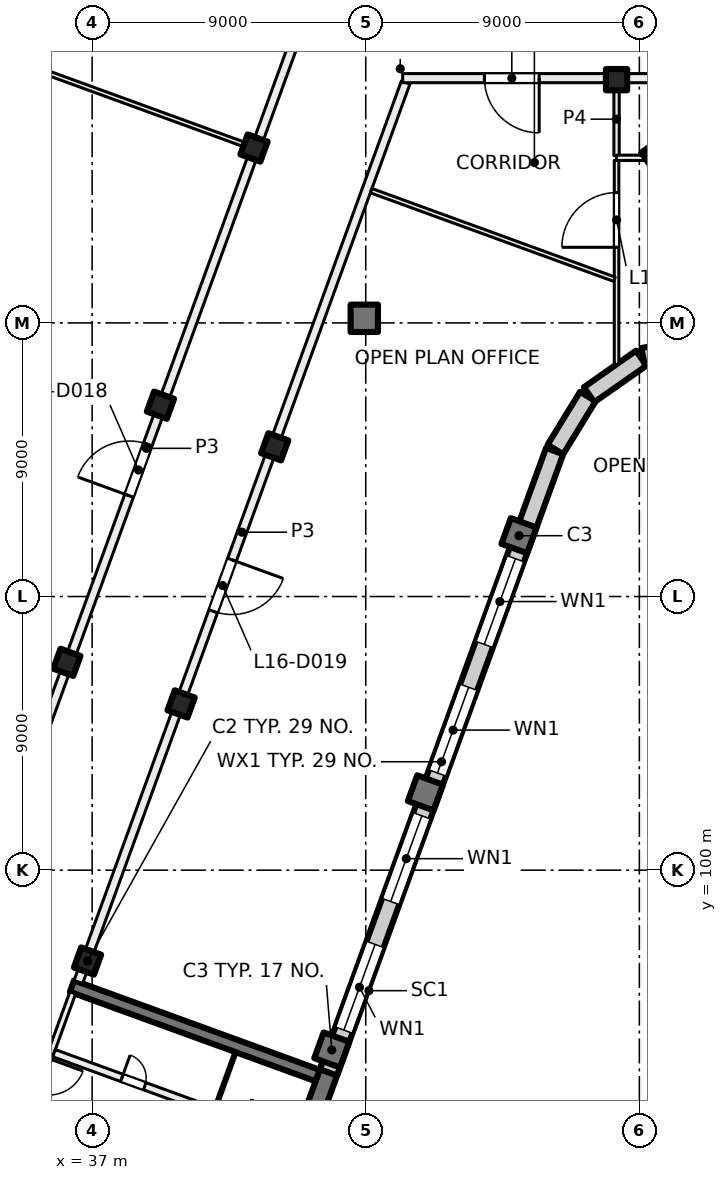
"""IFC4 building model, lengths in metres.
Left out: names, types, materials, properties, quantities, classifications, styles, units other than length and angle.
Written with IfcOpenShell. Run it as: python <this file> out.ifc"""

import sys

from ifc_helpers import new_model, si_unit, direction, frame, frame_2d, origin, origin_2d, place, context, subcontext, project, spatial, rectangle, hollow_rectangle, extrude, element, fill, save


model = new_model("IFC4")
c1 = context("Model", 3, precision=1e-05, world=origin(), true_north=direction((0.0, 1.0)))
c2 = subcontext(c1, "Body", "Model", "MODEL_VIEW")
j1 = project(units=[si_unit("LENGTHUNIT", "METRE"), si_unit("PLANEANGLEUNIT", "RADIAN")], contexts=[c1])
p1 = place(None, origin())
s1 = spatial("IfcSite", under=j1, at=p1, CompositionType="ELEMENT")
p2 = place(p1, origin())
s2 = spatial("IfcBuilding", under=s1, at=p2, CompositionType="ELEMENT")
p3 = place(p2, frame((0.0, 0.0, 71.5)))
s3 = spatial("IfcBuildingStorey", under=s2, at=p3, CompositionType="ELEMENT", Elevation=71.5)
p4 = place(p3, frame((56.036, 123.43, 0.0), z_axis=(0.0, 0.0, 1.0), x_axis=(0.573576436351, -0.819152044289, 0.0)))
e1 = element("IfcColumn", 1, at=p4, inside=s3, PredefinedType="COLUMN", context=c2, shape_type="SweptSolid", body=[
    extrude(hollow_rectangle(XDim=1.4, YDim=1.4, WallThickness=0.04, at=origin_2d()), origin(), (0.0, 0.0, 1.0), 4.0),
])
p5 = place(p3, frame((54.25, 126.0, 0.0), z_axis=(0.0, 0.0, 1.0), x_axis=(1.0, 0.0, 0.0)))
e2 = element("IfcColumn", 2, at=p5, inside=s3, PredefinedType="COLUMN", context=c2, shape_type="SweptSolid", body=[
    extrude(rectangle(XDim=0.7, YDim=0.7, at=origin_2d()), origin(), (0.0, 0.0, 1.0), 4.0),
])
p6 = place(p3, frame((45.952, 118.152, 0.0), z_axis=(0.0, 0.0, 1.0), x_axis=(1.0, 0.0, 0.0)))
e3 = element("IfcColumn", 3, at=p6, inside=s3, PredefinedType="COLUMN", context=c2, shape_type="SweptSolid", body=[
    extrude(rectangle(XDim=0.9, YDim=0.9, at=origin_2d()), origin(), (0.0, 0.0, 1.0), 4.0),
])
for number, where, z_axis, x_axis in (
    (4, (43.006, 113.925, 0.0), (0.0, 0.0, 1.0), (-0.342, -0.94, 0.0)),
    (5, (39.927, 105.468, 0.0), (0.0, 0.0, 1.0), (-0.342, -0.94, 0.0)),
    (6, (36.849, 97.011, 0.0), (0.0, 0.0, 1.0), (-0.342, -0.94, 0.0)),
    (7, (42.325, 123.751, 0.0), (0.0, 0.0, 1.0), (-0.342, -0.94, 0.0)),
    (8, (39.247, 115.293, 0.0), (0.0, 0.0, 1.0), (-0.342, -0.94, 0.0)),
    (9, (36.169, 106.836, 0.0), (0.0, 0.0, 1.0), (-0.342, -0.94, 0.0)),
):
    element("IfcColumn", number, at=place(p3, frame(where, z_axis=z_axis, x_axis=x_axis)), inside=s3, PredefinedType="COLUMN", context=c2, shape_type="SweptSolid", body=[
        extrude(rectangle(XDim=0.7, YDim=0.7, at=origin_2d()), origin(), (0.0, 0.0, 1.0), 4.0),
    ])
for number, where, z_axis, x_axis in (
    (10, (51.04, 111.001, 0.0), (0.0, 0.0, 1.0), (-0.342, -0.94, 0.0)),
    (11, (47.962, 102.544, 0.0), (0.0, 0.0, 1.0), (-0.342, -0.94, 0.0)),
    (12, (44.884, 94.087, 0.0), (0.0, 0.0, 1.0), (-0.342, -0.94, 0.0)),
):
    element("IfcColumn", number, at=place(p3, frame(where, z_axis=z_axis, x_axis=x_axis)), inside=s3, PredefinedType="COLUMN", context=c2, shape_type="SweptSolid", body=[
        extrude(rectangle(XDim=0.9, YDim=0.9, at=origin_2d()), origin(), (0.0, 0.0, 1.0), 4.0),
    ])
p7 = place(p3, frame((41.827, 85.249, 0.0), z_axis=(0.0, 0.0, 1.0), x_axis=(0.342016162452, 0.939694069696, 0.0)))
e13 = element("IfcWall", 13, at=p7, inside=s3, PredefinedType="SHEAR", context=c2, shape_type="SweptSolid", body=[
    extrude(rectangle(XDim=8.9, YDim=0.6, at=frame_2d((4.45, 0.0))), origin(), (0.0, 0.0, 1.0), 4.0),
])
p8 = place(p3, frame((44.418, 93.245, 0.0), z_axis=(0.0, 0.0, 1.0), x_axis=(-0.93969060187, 0.342025690201, 0.0)))
e14 = element("IfcWall", 14, at=p8, inside=s3, PredefinedType="SHEAR", context=c2, shape_type="SweptSolid", body=[
    extrude(rectangle(XDim=8.6, YDim=0.4, at=frame_2d((4.3, 0.0))), origin(), (0.0, 0.0, 1.0), 4.0),
])
p9 = place(p3, frame((52.212, 113.783, 0.0), z_axis=(0.0, 0.0, 1.0), x_axis=(-0.34202521188, -0.939690775968, 0.0)))
e15 = element("IfcWall", 15, at=p9, inside=s3, PredefinedType="SOLIDWALL", context=c2, shape_type="SweptSolid", body=[
    extrude(rectangle(XDim=21.745, YDim=0.6, at=frame_2d((10.873, 0.0))), origin(), (0.0, 0.0, 1.0), 3.625),
])
p10 = place(p9, frame((3.765, 0.0, 0.9)))
e16 = element("IfcOpeningElement", 16, at=p10, cuts=e15, PredefinedType="OPENING", context=c2, shape_type="SweptSolid", body=[
    extrude(rectangle(XDim=3.0, YDim=2.4, at=frame_2d((1.5, 1.2))), frame((0.0, 0.31, 0.0), z_axis=(0.0, -1.0, 0.0), x_axis=(1.0, 0.0, 0.0)), (0.0, 0.0, 1.0), 0.62),
])
p11 = place(p9, frame((8.265, 0.0, 0.9)))
e17 = element("IfcOpeningElement", 17, at=p11, cuts=e15, PredefinedType="OPENING", context=c2, shape_type="SweptSolid", body=[
    extrude(rectangle(XDim=3.0, YDim=2.4, at=frame_2d((1.5, 1.2))), frame((0.0, 0.31, 0.0), z_axis=(0.0, -1.0, 0.0), x_axis=(1.0, 0.0, 0.0)), (0.0, 0.0, 1.0), 0.62),
])
p12 = place(p9, frame((12.765, 0.0, 0.9)))
e18 = element("IfcOpeningElement", 18, at=p12, cuts=e15, PredefinedType="OPENING", context=c2, shape_type="SweptSolid", body=[
    extrude(rectangle(XDim=3.0, YDim=2.4, at=frame_2d((1.5, 1.2))), frame((0.0, 0.31, 0.0), z_axis=(0.0, -1.0, 0.0), x_axis=(1.0, 0.0, 0.0)), (0.0, 0.0, 1.0), 0.62),
])
p13 = place(p9, frame((17.265, 0.0, 0.9)))
e19 = element("IfcOpeningElement", 19, at=p13, cuts=e15, PredefinedType="OPENING", context=c2, shape_type="SweptSolid", body=[
    extrude(rectangle(XDim=3.0, YDim=2.4, at=frame_2d((1.5, 1.2))), frame((0.0, 0.31, 0.0), z_axis=(0.0, -1.0, 0.0), x_axis=(1.0, 0.0, 0.0)), (0.0, 0.0, 1.0), 0.62),
])
p14 = place(p3, frame((53.305, 115.578, 0.0), z_axis=(0.0, 0.0, 1.0), x_axis=(-0.522402266438, -0.852699168535, 0.0)))
e20 = element("IfcWall", 20, at=p14, inside=s3, PredefinedType="SOLIDWALL", context=c2, shape_type="SweptSolid", body=[
    extrude(rectangle(XDim=2.042, YDim=0.6, at=frame_2d((1.021, 0.0))), origin(), (0.0, 0.0, 1.0), 3.625),
])
for number, where, z_axis, x_axis in (
    (21, (55.062, 116.839, 0.0), (0.0, 0.0, 1.0), (-0.819, -0.574, 0.0)),
    (22, (57.175, 117.294, 0.0), (0.0, 0.0, 1.0), (-0.98, -0.199, 0.0)),
):
    element("IfcWall", number, at=place(p3, frame(where, z_axis=z_axis, x_axis=x_axis)), inside=s3, PredefinedType="SOLIDWALL", context=c2, shape_type="SweptSolid", body=[
        extrude(rectangle(XDim=2.092, YDim=0.6, at=frame_2d((1.046, 0.0))), origin(), (0.0, 0.0, 1.0), 3.625),
    ])
p15 = place(p3, frame((24.666, 100.669, 0.0), z_axis=(0.0, 0.0, 1.0), x_axis=(0.34201964167, 0.939692803373, 0.0)))
e23 = element("IfcWall", 23, at=p15, inside=s3, PredefinedType="SOLIDWALL", context=c2, shape_type="SweptSolid", body=[
    extrude(rectangle(XDim=32.884, YDim=0.6, at=frame_2d((16.442, 0.0))), origin(), (0.0, 0.0, 1.0), 3.625),
])
p16 = place(p15, frame((1.48, 0.0, 0.9)))
e24 = element("IfcOpeningElement", 24, at=p16, cuts=e23, PredefinedType="OPENING", context=c2, shape_type="SweptSolid", body=[
    extrude(rectangle(XDim=3.0, YDim=2.4, at=frame_2d((1.5, 1.2))), frame((0.0, 0.31, 0.0), z_axis=(0.0, -1.0, 0.0), x_axis=(1.0, 0.0, 0.0)), (0.0, 0.0, 1.0), 0.62),
])
p17 = place(p15, frame((5.98, 0.0, 0.9)))
e25 = element("IfcOpeningElement", 25, at=p17, cuts=e23, PredefinedType="OPENING", context=c2, shape_type="SweptSolid", body=[
    extrude(rectangle(XDim=3.0, YDim=2.4, at=frame_2d((1.5, 1.2))), frame((0.0, 0.31, 0.0), z_axis=(0.0, -1.0, 0.0), x_axis=(1.0, 0.0, 0.0)), (0.0, 0.0, 1.0), 0.62),
])
p18 = place(p15, frame((10.48, 0.0, 0.9)))
e26 = element("IfcOpeningElement", 26, at=p18, cuts=e23, PredefinedType="OPENING", context=c2, shape_type="SweptSolid", body=[
    extrude(rectangle(XDim=3.0, YDim=2.4, at=frame_2d((1.5, 1.2))), frame((0.0, 0.31, 0.0), z_axis=(0.0, -1.0, 0.0), x_axis=(1.0, 0.0, 0.0)), (0.0, 0.0, 1.0), 0.62),
])
p19 = place(p15, frame((14.98, 0.0, 0.9)))
e27 = element("IfcOpeningElement", 27, at=p19, cuts=e23, PredefinedType="OPENING", context=c2, shape_type="SweptSolid", body=[
    extrude(rectangle(XDim=3.0, YDim=2.4, at=frame_2d((1.5, 1.2))), frame((0.0, 0.31, 0.0), z_axis=(0.0, -1.0, 0.0), x_axis=(1.0, 0.0, 0.0)), (0.0, 0.0, 1.0), 0.62),
])
p20 = place(p15, frame((19.48, 0.0, 0.9)))
e28 = element("IfcOpeningElement", 28, at=p20, cuts=e23, PredefinedType="OPENING", context=c2, shape_type="SweptSolid", body=[
    extrude(rectangle(XDim=3.0, YDim=2.4, at=frame_2d((1.5, 1.2))), frame((0.0, 0.31, 0.0), z_axis=(0.0, -1.0, 0.0), x_axis=(1.0, 0.0, 0.0)), (0.0, 0.0, 1.0), 0.62),
])
p21 = place(p15, frame((23.98, 0.0, 0.9)))
e29 = element("IfcOpeningElement", 29, at=p21, cuts=e23, PredefinedType="OPENING", context=c2, shape_type="SweptSolid", body=[
    extrude(rectangle(XDim=3.0, YDim=2.4, at=frame_2d((1.5, 1.2))), frame((0.0, 0.31, 0.0), z_axis=(0.0, -1.0, 0.0), x_axis=(1.0, 0.0, 0.0)), (0.0, 0.0, 1.0), 0.62),
])
p22 = place(p15, frame((28.48, 0.0, 0.9)))
e30 = element("IfcOpeningElement", 30, at=p22, cuts=e23, PredefinedType="OPENING", context=c2, shape_type="SweptSolid", body=[
    extrude(rectangle(XDim=3.0, YDim=2.4, at=frame_2d((1.5, 1.2))), frame((0.0, 0.31, 0.0), z_axis=(0.0, -1.0, 0.0), x_axis=(1.0, 0.0, 0.0)), (0.0, 0.0, 1.0), 0.62),
])
p23 = place(p3, frame((36.362, 95.964, 0.0), z_axis=(0.0, 0.0, 1.0), x_axis=(-0.341995824804, -0.939701471648, 0.0)))
e31 = element("IfcWall", 31, at=p23, inside=s3, PredefinedType="PARTITIONING", context=c2, shape_type="SweptSolid", body=[
    extrude(rectangle(XDim=3.8, YDim=0.2, at=frame_2d((1.9, 0.0))), origin(), (0.0, 0.0, 1.0), 3.625),
])
p24 = place(p23, frame((2.3, 0.0, 0.0)))
e32 = element("IfcOpeningElement", 32, at=p24, cuts=e31, PredefinedType="OPENING", context=c2, shape_type="SweptSolid", body=[
    extrude(rectangle(XDim=1.2, YDim=2.1, at=frame_2d((0.6, 1.05))), frame((0.0, 0.11, 0.0), z_axis=(0.0, -1.0, 0.0), x_axis=(1.0, 0.0, 0.0)), (0.0, 0.0, 1.0), 0.22),
])
p25 = place(p3, frame((35.19, 92.453, 0.0), z_axis=(0.0, 0.0, 1.0), x_axis=(0.939691552312, -0.342023078919, 0.0)))
e33 = element("IfcWall", 33, at=p25, inside=s3, PredefinedType="PARTITIONING", context=c2, shape_type="SweptSolid", body=[
    extrude(rectangle(XDim=8.4, YDim=0.2, at=frame_2d((4.2, 0.0))), origin(), (0.0, 0.0, 1.0), 3.625),
])
p26 = place(p25, frame((5.25, 0.0, 0.0)))
e34 = element("IfcOpeningElement", 34, at=p26, cuts=e33, PredefinedType="OPENING", context=c2, shape_type="SweptSolid", body=[
    extrude(rectangle(XDim=1.5, YDim=2.1, at=frame_2d((0.75, 1.05))), frame((0.0, 0.11, 0.0), z_axis=(0.0, -1.0, 0.0), x_axis=(1.0, 0.0, 0.0)), (0.0, 0.0, 1.0), 0.22),
])
p27 = place(p3, frame((35.746, 93.98, 0.0), z_axis=(0.0, 0.0, 1.0), x_axis=(0.939691552312, -0.342023078919, 0.0)))
e35 = element("IfcWall", 35, at=p27, inside=s3, PredefinedType="PARTITIONING", context=c2, shape_type="SweptSolid", body=[
    extrude(rectangle(XDim=8.4, YDim=0.25, at=frame_2d((4.2, 0.0))), origin(), (0.0, 0.0, 1.0), 3.625),
])
p28 = place(p27, frame((2.375, 0.0, 0.0)))
e36 = element("IfcOpeningElement", 36, at=p28, cuts=e35, PredefinedType="OPENING", context=c2, shape_type="SweptSolid", body=[
    extrude(rectangle(XDim=0.8, YDim=2.1, at=frame_2d((0.4, 1.05))), frame((0.0, 0.135, 0.0), z_axis=(0.0, -1.0, 0.0), x_axis=(1.0, 0.0, 0.0)), (0.0, 0.0, 1.0), 0.27),
])
p29 = place(p27, frame((6.625, 0.0, 0.0)))
e37 = element("IfcOpeningElement", 37, at=p29, cuts=e35, PredefinedType="OPENING", context=c2, shape_type="SweptSolid", body=[
    extrude(rectangle(XDim=0.8, YDim=2.1, at=frame_2d((0.4, 1.05))), frame((0.0, 0.135, 0.0), z_axis=(0.0, -1.0, 0.0), x_axis=(1.0, 0.0, 0.0)), (0.0, 0.0, 1.0), 0.27),
])
p30 = place(p3, frame((41.718, 94.015, 0.0), z_axis=(0.0, 0.0, 1.0), x_axis=(-0.342064742067, -0.939676386973, 0.0)))
e38 = element("IfcWall", 38, at=p30, inside=s3, PredefinedType="PARTITIONING", context=c2, shape_type="SweptSolid", body=[
    extrude(rectangle(XDim=1.95, YDim=0.1, at=frame_2d((0.975, 0.0))), origin(), (0.0, 0.0, 1.0), 3.625),
])
p31 = place(p3, frame((32.881, 97.657, 0.0), z_axis=(0.0, 0.0, 1.0), x_axis=(0.342017360004, 0.939693633828, 0.0)))
e39 = element("IfcWall", 39, at=p31, inside=s3, PredefinedType="PARTITIONING", context=c2, shape_type="SweptSolid", body=[
    extrude(rectangle(XDim=34.516, YDim=0.3, at=frame_2d((17.258, 0.0))), origin(), (0.0, 0.0, 1.0), 3.625),
])
p32 = place(p31, frame((2.025, 0.0, 0.0)))
e40 = element("IfcOpeningElement", 40, at=p32, cuts=e39, PredefinedType="OPENING", context=c2, shape_type="SweptSolid", body=[
    extrude(rectangle(XDim=1.2, YDim=2.1, at=frame_2d((0.6, 1.05))), frame((0.0, 0.16, 0.0), z_axis=(0.0, -1.0, 0.0), x_axis=(1.0, 0.0, 0.0)), (0.0, 0.0, 1.0), 0.32),
])
p33 = place(p31, frame((15.6, 0.0, 0.0)))
e41 = element("IfcOpeningElement", 41, at=p33, cuts=e39, PredefinedType="OPENING", context=c2, shape_type="SweptSolid", body=[
    extrude(rectangle(XDim=1.8, YDim=2.1, at=frame_2d((0.9, 1.05))), frame((0.0, 0.16, 0.0), z_axis=(0.0, -1.0, 0.0), x_axis=(1.0, 0.0, 0.0)), (0.0, 0.0, 1.0), 0.32),
])
p34 = place(p3, frame((42.231, 123.785, 0.0), z_axis=(0.0, 0.0, 1.0), x_axis=(-0.939687752599, 0.342033518263, 0.0)))
e42 = element("IfcWall", 42, at=p34, inside=s3, PredefinedType="PARTITIONING", context=c2, shape_type="SweptSolid", body=[
    extrude(rectangle(XDim=8.301, YDim=0.15, at=frame_2d((4.15, 0.0))), origin(), (0.0, 0.0, 1.0), 3.625),
])
p35 = place(p3, frame((47.314, 125.909, 0.0), z_axis=(0.0, 0.0, 1.0), x_axis=(-0.342010770371, -0.939696032209, 0.0)))
e43 = element("IfcWall", 43, at=p35, inside=s3, PredefinedType="PARTITIONING", context=c2, shape_type="SweptSolid", body=[
    extrude(rectangle(XDim=31.485, YDim=0.3, at=frame_2d((15.742, 0.0))), origin(), (0.0, 0.0, 1.0), 3.625),
])
p36 = place(p35, frame((16.709, 0.0, 0.0)))
e44 = element("IfcOpeningElement", 44, at=p36, cuts=e43, PredefinedType="OPENING", context=c2, shape_type="SweptSolid", body=[
    extrude(rectangle(XDim=1.8, YDim=2.1, at=frame_2d((0.9, 1.05))), frame((0.0, 0.16, 0.0), z_axis=(0.0, -1.0, 0.0), x_axis=(1.0, 0.0, 0.0)), (0.0, 0.0, 1.0), 0.32),
])
p37 = place(p3, frame((54.25, 116.637, 0.0), z_axis=(0.0, 0.0, 1.0), x_axis=(0.0, 1.0, 0.0)))
e45 = element("IfcWall", 45, at=p37, inside=s3, PredefinedType="PARTITIONING", context=c2, shape_type="SweptSolid", body=[
    extrude(rectangle(XDim=6.709, YDim=0.15, at=frame_2d((3.354, 0.0))), origin(), (0.0, 0.0, 1.0), 3.625),
])
p38 = place(p37, frame((3.85, 0.0, 0.0)))
e46 = element("IfcOpeningElement", 46, at=p38, cuts=e45, PredefinedType="OPENING", context=c2, shape_type="SweptSolid", body=[
    extrude(rectangle(XDim=1.8, YDim=2.1, at=frame_2d((0.9, 1.05))), frame((0.0, 0.085, 0.0), z_axis=(0.0, -1.0, 0.0), x_axis=(1.0, 0.0, 0.0)), (0.0, 0.0, 1.0), 0.17),
])
p39 = place(p3, frame((54.18, 119.436, 0.0), z_axis=(0.0, 0.0, 1.0), x_axis=(-0.939669476286, 0.342083725624, 0.0)))
e47 = element("IfcWall", 47, at=p39, inside=s3, PredefinedType="PARTITIONING", context=c2, shape_type="SweptSolid", body=[
    extrude(rectangle(XDim=8.516, YDim=0.15, at=frame_2d((4.258, 0.0))), origin(), (0.0, 0.0, 1.0), 3.625),
])
p40 = place(p3, frame((54.25, 123.502, 0.0), z_axis=(0.0, 0.0, 1.0), x_axis=(0.0, 1.0, 0.0)))
e48 = element("IfcWall", 48, at=p40, inside=s3, PredefinedType="PARTITIONING", context=c2, shape_type="SweptSolid", body=[
    extrude(rectangle(XDim=2.398, YDim=0.175, at=frame_2d((1.199, 0.0))), origin(), (0.0, 0.0, 1.0), 3.625),
])
p41 = place(p3, frame((54.25, 123.43, 0.0), z_axis=(0.0, 0.0, 1.0), x_axis=(1.0, 0.0, 0.0)))
e49 = element("IfcWall", 49, at=p41, inside=s3, PredefinedType="PARTITIONING", context=c2, shape_type="SweptSolid", body=[
    extrude(rectangle(XDim=13.412, YDim=0.175, at=frame_2d((6.706, 0.0))), origin(), (0.0, 0.0, 1.0), 3.625),
])
p42 = place(p41, frame((6.116, 0.0, 0.0)))
e50 = element("IfcOpeningElement", 50, at=p42, cuts=e49, PredefinedType="OPENING", context=c2, shape_type="SweptSolid", body=[
    extrude(rectangle(XDim=1.2, YDim=2.1, at=frame_2d((0.6, 1.05))), frame((0.0, 0.097, 0.0), z_axis=(0.0, -1.0, 0.0), x_axis=(1.0, 0.0, 0.0)), (0.0, 0.0, 1.0), 0.195),
])
p43 = place(p3, frame((91.0, 126.05, 0.0), z_axis=(0.0, 0.0, 1.0), x_axis=(-1.0, 0.0, 0.0)))
e51 = element("IfcWall", 51, at=p43, inside=s3, PredefinedType="PARTITIONING", context=c2, shape_type="SweptSolid", body=[
    extrude(rectangle(XDim=43.785, YDim=0.3, at=frame_2d((21.893, 0.0))), origin(), (0.0, 0.0, 1.0), 3.625),
])
p44 = place(p43, frame((2.025, 0.0, 0.0)))
e52 = element("IfcOpeningElement", 52, at=p44, cuts=e51, PredefinedType="OPENING", context=c2, shape_type="SweptSolid", body=[
    extrude(rectangle(XDim=1.2, YDim=2.1, at=frame_2d((0.6, 1.05))), frame((0.0, 0.16, 0.0), z_axis=(0.0, -1.0, 0.0), x_axis=(1.0, 0.0, 0.0)), (0.0, 0.0, 1.0), 0.32),
])
p45 = place(p43, frame((7.0, 0.0, 0.0)))
e53 = element("IfcOpeningElement", 53, at=p45, cuts=e51, PredefinedType="OPENING", context=c2, shape_type="SweptSolid", body=[
    extrude(rectangle(XDim=1.0, YDim=2.1, at=frame_2d((0.5, 1.05))), frame((0.0, 0.16, 0.0), z_axis=(0.0, -1.0, 0.0), x_axis=(1.0, 0.0, 0.0)), (0.0, 0.0, 1.0), 0.32),
])
p46 = place(p43, frame((11.5, 0.0, 0.0)))
e54 = element("IfcOpeningElement", 54, at=p46, cuts=e51, PredefinedType="OPENING", context=c2, shape_type="SweptSolid", body=[
    extrude(rectangle(XDim=1.0, YDim=2.1, at=frame_2d((0.5, 1.05))), frame((0.0, 0.16, 0.0), z_axis=(0.0, -1.0, 0.0), x_axis=(1.0, 0.0, 0.0)), (0.0, 0.0, 1.0), 0.32),
])
p47 = place(p43, frame((16.0, 0.0, 0.0)))
e55 = element("IfcOpeningElement", 55, at=p47, cuts=e51, PredefinedType="OPENING", context=c2, shape_type="SweptSolid", body=[
    extrude(rectangle(XDim=1.0, YDim=2.1, at=frame_2d((0.5, 1.05))), frame((0.0, 0.16, 0.0), z_axis=(0.0, -1.0, 0.0), x_axis=(1.0, 0.0, 0.0)), (0.0, 0.0, 1.0), 0.32),
])
p48 = place(p43, frame((20.5, 0.0, 0.0)))
e56 = element("IfcOpeningElement", 56, at=p48, cuts=e51, PredefinedType="OPENING", context=c2, shape_type="SweptSolid", body=[
    extrude(rectangle(XDim=1.0, YDim=2.1, at=frame_2d((0.5, 1.05))), frame((0.0, 0.16, 0.0), z_axis=(0.0, -1.0, 0.0), x_axis=(1.0, 0.0, 0.0)), (0.0, 0.0, 1.0), 0.32),
])
p49 = place(p43, frame((39.296, 0.0, 0.0)))
e57 = element("IfcOpeningElement", 57, at=p49, cuts=e51, PredefinedType="OPENING", context=c2, shape_type="SweptSolid", body=[
    extrude(rectangle(XDim=1.8, YDim=2.1, at=frame_2d((0.9, 1.05))), frame((0.0, 0.16, 0.0), z_axis=(0.0, -1.0, 0.0), x_axis=(1.0, 0.0, 0.0)), (0.0, 0.0, 1.0), 0.32),
])
p50 = place(p10, origin())
e58 = element("IfcWindow", 58, at=p50, inside=s3, PartitioningType="SINGLE_PANEL", PredefinedType="WINDOW", context=c2, shape_type="SweptSolid", body=[
    extrude(rectangle(XDim=3.0, YDim=2.4, at=frame_2d((1.5, 1.2))), frame((0.0, 0.03, 0.0), z_axis=(0.0, -1.0, 0.0), x_axis=(1.0, 0.0, 0.0)), (0.0, 0.0, 1.0), 0.06),
])
fill(e16, e58)
p51 = place(p11, origin())
e59 = element("IfcWindow", 59, at=p51, inside=s3, PartitioningType="SINGLE_PANEL", PredefinedType="WINDOW", context=c2, shape_type="SweptSolid", body=[
    extrude(rectangle(XDim=3.0, YDim=2.4, at=frame_2d((1.5, 1.2))), frame((0.0, 0.03, 0.0), z_axis=(0.0, -1.0, 0.0), x_axis=(1.0, 0.0, 0.0)), (0.0, 0.0, 1.0), 0.06),
])
fill(e17, e59)
p52 = place(p12, origin())
e60 = element("IfcWindow", 60, at=p52, inside=s3, PartitioningType="SINGLE_PANEL", PredefinedType="WINDOW", context=c2, shape_type="SweptSolid", body=[
    extrude(rectangle(XDim=3.0, YDim=2.4, at=frame_2d((1.5, 1.2))), frame((0.0, 0.03, 0.0), z_axis=(0.0, -1.0, 0.0), x_axis=(1.0, 0.0, 0.0)), (0.0, 0.0, 1.0), 0.06),
])
fill(e18, e60)
p53 = place(p13, origin())
e61 = element("IfcWindow", 61, at=p53, inside=s3, PartitioningType="SINGLE_PANEL", PredefinedType="WINDOW", context=c2, shape_type="SweptSolid", body=[
    extrude(rectangle(XDim=3.0, YDim=2.4, at=frame_2d((1.5, 1.2))), frame((0.0, 0.03, 0.0), z_axis=(0.0, -1.0, 0.0), x_axis=(1.0, 0.0, 0.0)), (0.0, 0.0, 1.0), 0.06),
])
fill(e19, e61)
p54 = place(p28, origin())
e62 = element("IfcDoor", 62, at=p54, inside=s3, OperationType="SINGLE_SWING_RIGHT", PredefinedType="DOOR", context=c2, shape_type="SweptSolid", body=[
    extrude(rectangle(XDim=0.8, YDim=2.1, at=frame_2d((0.4, 1.05))), frame((0.0, 0.025, 0.0), z_axis=(0.0, -1.0, 0.0), x_axis=(1.0, 0.0, 0.0)), (0.0, 0.0, 1.0), 0.05),
])
fill(e36, e62)
p55 = place(p38, origin())
e63 = element("IfcDoor", 63, at=p55, inside=s3, OperationType="DOUBLE_DOOR_SINGLE_SWING", PredefinedType="DOOR", context=c2, shape_type="SweptSolid", body=[
    extrude(rectangle(XDim=1.8, YDim=2.1, at=frame_2d((0.9, 1.05))), frame((0.0, 0.025, 0.0), z_axis=(0.0, -1.0, 0.0), x_axis=(1.0, 0.0, 0.0)), (0.0, 0.0, 1.0), 0.05),
])
fill(e46, e63)
p56 = place(p33, origin())
e64 = element("IfcDoor", 64, at=p56, inside=s3, OperationType="DOUBLE_DOOR_SINGLE_SWING", PredefinedType="DOOR", context=c2, shape_type="SweptSolid", body=[
    extrude(rectangle(XDim=1.8, YDim=2.1, at=frame_2d((0.9, 1.05))), frame((0.0, 0.025, 0.0), z_axis=(0.0, -1.0, 0.0), x_axis=(1.0, 0.0, 0.0)), (0.0, 0.0, 1.0), 0.05),
])
fill(e41, e64)
p57 = place(p36, origin())
e65 = element("IfcDoor", 65, at=p57, inside=s3, OperationType="DOUBLE_DOOR_SINGLE_SWING", PredefinedType="DOOR", context=c2, shape_type="SweptSolid", body=[
    extrude(rectangle(XDim=1.8, YDim=2.1, at=frame_2d((0.9, 1.05))), frame((0.0, 0.025, 0.0), z_axis=(0.0, -1.0, 0.0), x_axis=(1.0, 0.0, 0.0)), (0.0, 0.0, 1.0), 0.05),
])
fill(e44, e65)
p58 = place(p49, origin())
e66 = element("IfcDoor", 66, at=p58, inside=s3, OperationType="DOUBLE_DOOR_SINGLE_SWING", PredefinedType="DOOR", context=c2, shape_type="SweptSolid", body=[
    extrude(rectangle(XDim=1.8, YDim=2.1, at=frame_2d((0.9, 1.05))), frame((0.0, 0.025, 0.0), z_axis=(0.0, -1.0, 0.0), x_axis=(1.0, 0.0, 0.0)), (0.0, 0.0, 1.0), 0.05),
])
fill(e57, e66)
save(model, sys.argv[1])
